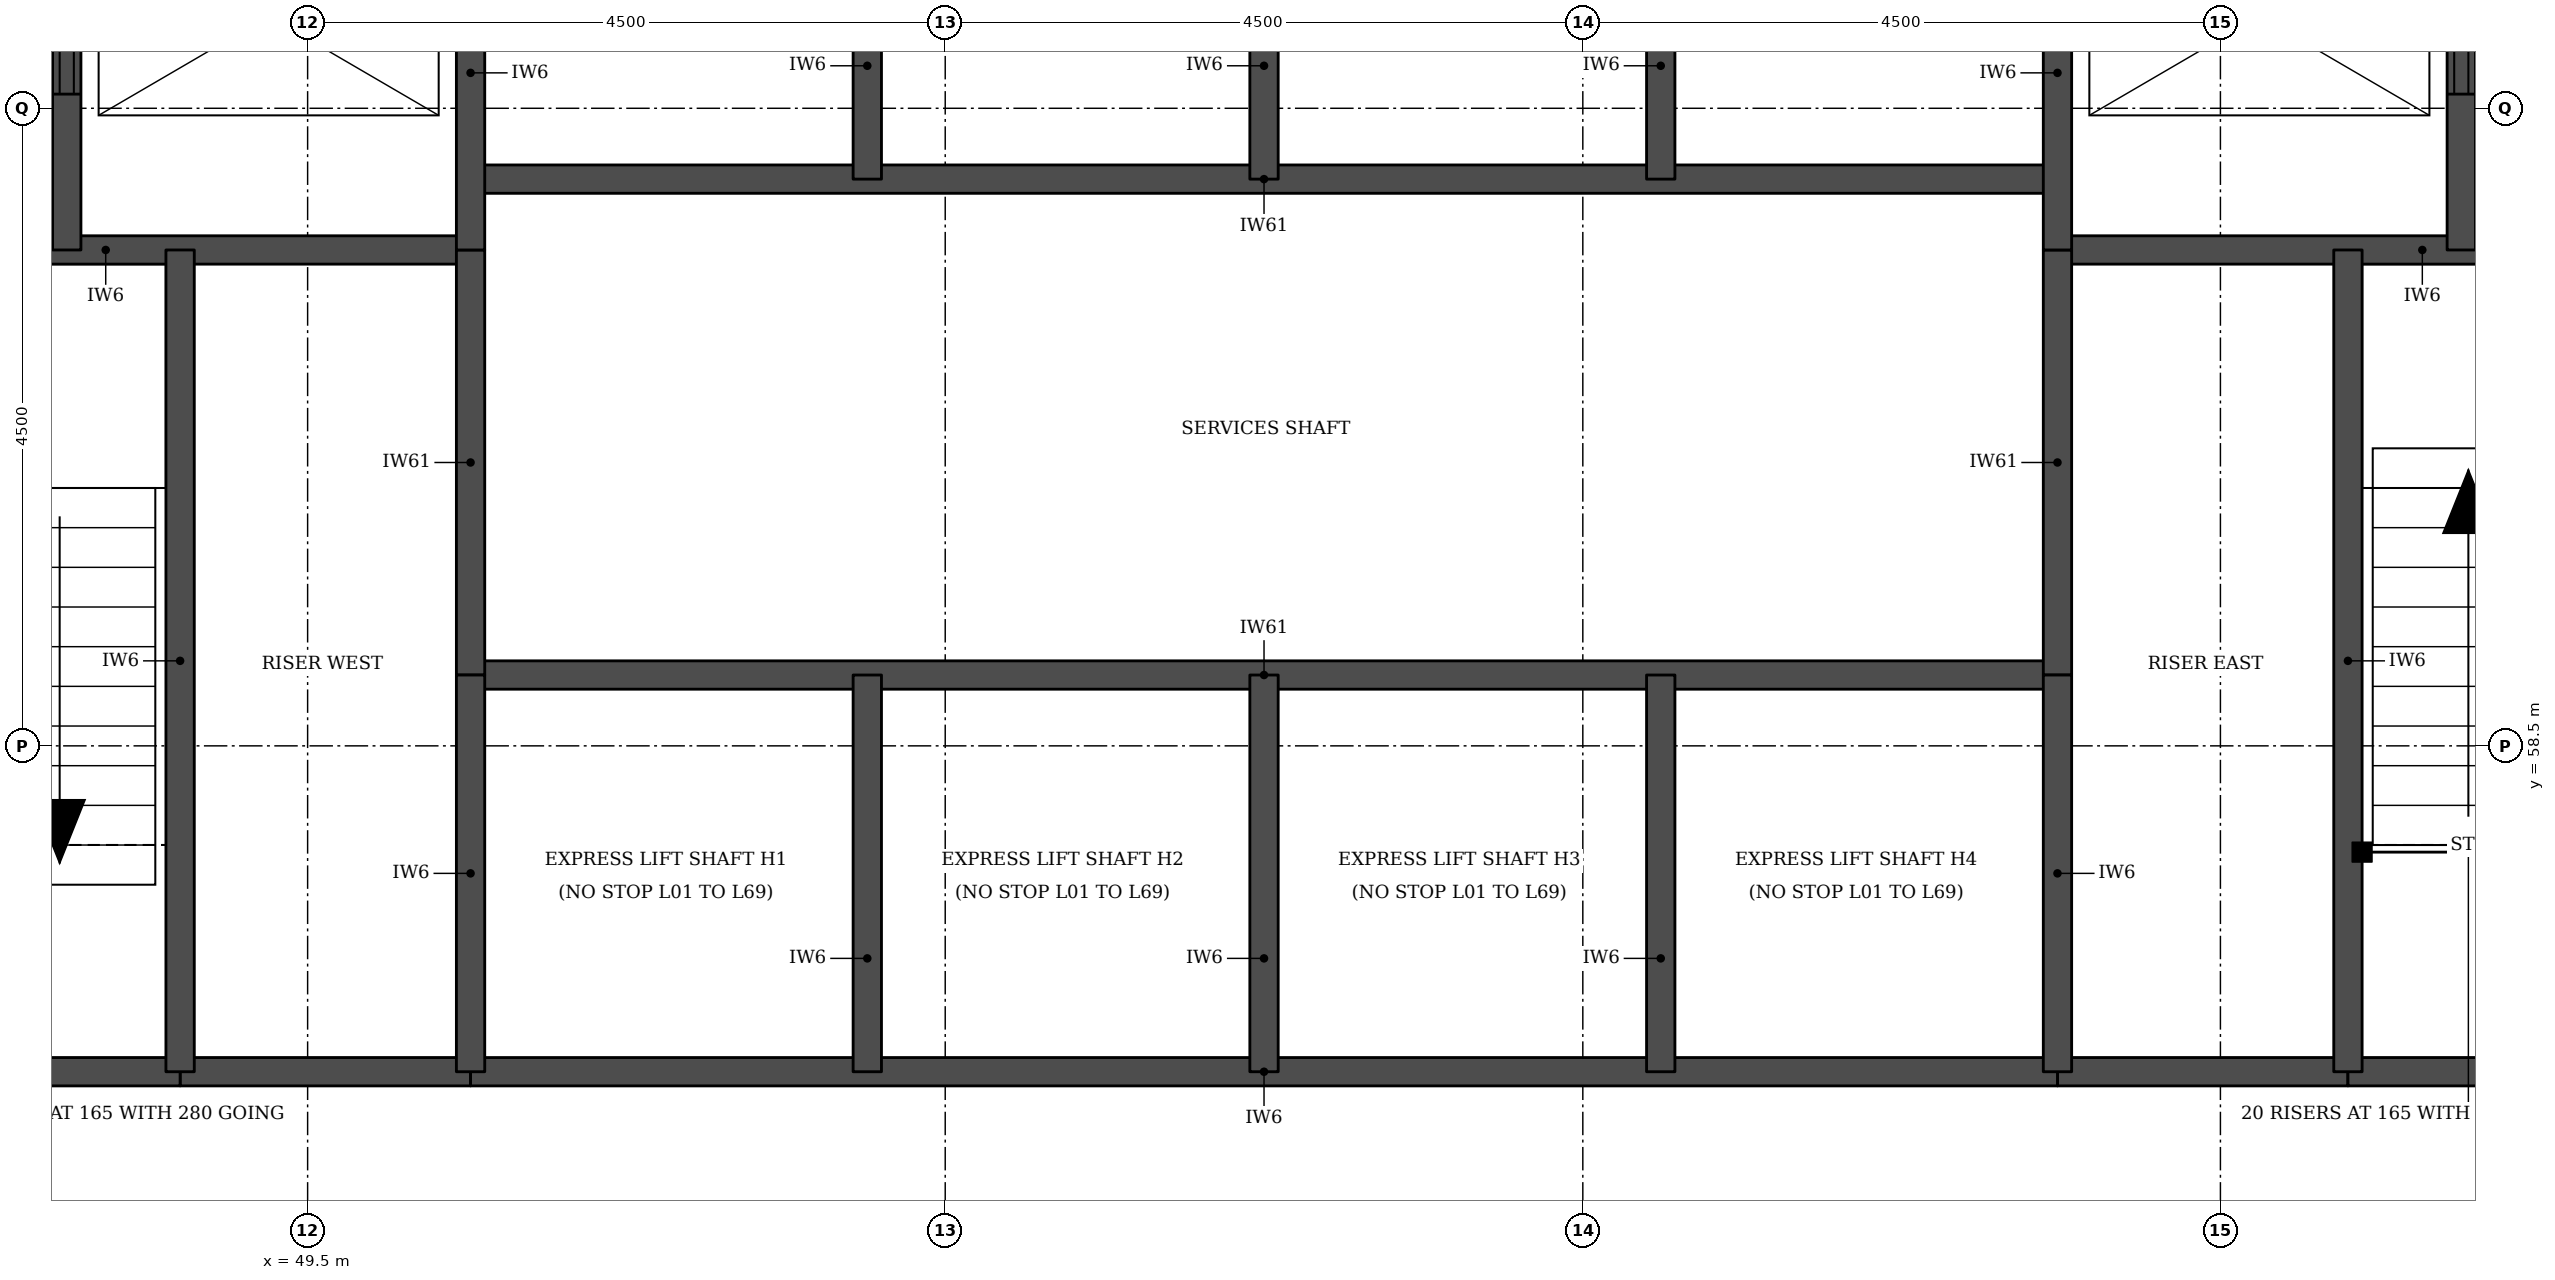
"""IFC4 building model, lengths in metres.
Left out: names, types, materials, properties, quantities, classifications, styles, units other than length and angle.
Written with IfcOpenShell. Run it as: python <this file> out.ifc"""

import sys

from ifc_helpers import new_model, si_unit, direction, frame, frame_2d, origin, place, context, subcontext, project, spatial, rectangle, extrude, element, fill, save


model = new_model("IFC4")
c1 = context("Model", 3, precision=1e-05, world=origin(), true_north=direction((0.0, 1.0)))
c2 = subcontext(c1, "Body", "Model", "MODEL_VIEW")
j1 = project(units=[si_unit("LENGTHUNIT", "METRE"), si_unit("PLANEANGLEUNIT", "RADIAN")], contexts=[c1])
p1 = place(None, origin())
s1 = spatial("IfcSite", under=j1, at=p1, CompositionType="ELEMENT")
p2 = place(p1, origin())
s2 = spatial("IfcBuilding", under=s1, at=p2, CompositionType="ELEMENT")
p3 = place(p2, frame((0.0, 0.0, 26.4)))
s3 = spatial("IfcBuildingStorey", under=s2, at=p3, CompositionType="ELEMENT", Elevation=26.4)
for number, where, z_axis, x_axis in (
    (1, (48.6, 56.2, 0.0), (0.0, 0.0, 1.0), (1.0, 0.0, 0.0)),
    (2, (61.85, 56.2, 0.0), (0.0, 0.0, 1.0), (1.0, 0.0, 0.0)),
):
    element("IfcWall", number, at=place(p3, frame(where, z_axis=z_axis, x_axis=x_axis)), inside=s3, PredefinedType="SOLIDWALL", context=c2, shape_type="SweptSolid", body=[
        extrude(rectangle(XDim=2.05, YDim=0.2, at=frame_2d((1.025, 0.0))), origin(), (0.0, 0.0, 1.0), 3.08),
    ])
p4 = place(p3, frame((45.5, 56.2, 0.0), z_axis=(0.0, 0.0, 1.0), x_axis=(1.0, 0.0, 0.0)))
e3 = element("IfcWall", 3, at=p4, inside=s3, PredefinedType="SOLIDWALL", context=c2, shape_type="SweptSolid", body=[
    extrude(rectangle(XDim=3.1, YDim=0.2, at=frame_2d((1.55, 0.0))), origin(), (0.0, 0.0, 1.0), 3.08),
])
p5 = place(p3, frame((50.65, 56.2, 0.0), z_axis=(0.0, 0.0, 1.0), x_axis=(1.0, 0.0, 0.0)))
e4 = element("IfcWall", 4, at=p5, inside=s3, PredefinedType="SOLIDWALL", context=c2, shape_type="SweptSolid", body=[
    extrude(rectangle(XDim=11.2, YDim=0.2, at=frame_2d((5.6, 0.0))), origin(), (0.0, 0.0, 1.0), 3.08),
])
p6 = place(p3, frame((63.9, 56.2, 0.0), z_axis=(0.0, 0.0, 1.0), x_axis=(1.0, 0.0, 0.0)))
e5 = element("IfcWall", 5, at=p6, inside=s3, PredefinedType="SOLIDWALL", context=c2, shape_type="SweptSolid", body=[
    extrude(rectangle(XDim=3.1, YDim=0.2, at=frame_2d((1.55, 0.0))), origin(), (0.0, 0.0, 1.0), 3.08),
])
p7 = place(p3, frame((50.65, 59.0, 0.0), z_axis=(0.0, 0.0, 1.0), x_axis=(1.0, 0.0, 0.0)))
e6 = element("IfcWall", 6, at=p7, inside=s3, PredefinedType="SOLIDWALL", context=c2, shape_type="SweptSolid", body=[
    extrude(rectangle(XDim=11.2, YDim=0.2, at=frame_2d((5.6, 0.0))), origin(), (0.0, 0.0, 1.0), 3.3),
])
for number, where, z_axis, x_axis in (
    (7, (45.5, 62.0, 0.0), (0.0, 0.0, 1.0), (1.0, 0.0, 0.0)),
    (8, (61.85, 62.0, 0.0), (0.0, 0.0, 1.0), (1.0, 0.0, 0.0)),
):
    element("IfcWall", number, at=place(p3, frame(where, z_axis=z_axis, x_axis=x_axis)), inside=s3, PredefinedType="SOLIDWALL", context=c2, shape_type="SweptSolid", body=[
        extrude(rectangle(XDim=5.15, YDim=0.2, at=frame_2d((2.575, 0.0))), origin(), (0.0, 0.0, 1.0), 3.08),
    ])
p8 = place(p3, frame((50.65, 62.5, 0.0), z_axis=(0.0, 0.0, 1.0), x_axis=(1.0, 0.0, 0.0)))
e9 = element("IfcWall", 9, at=p8, inside=s3, PredefinedType="SOLIDWALL", context=c2, shape_type="SweptSolid", body=[
    extrude(rectangle(XDim=11.2, YDim=0.2, at=frame_2d((5.6, 0.0))), origin(), (0.0, 0.0, 1.0), 3.3),
])
p9 = place(p3, frame((47.8, 62.0, 0.0), z_axis=(0.0, 0.0, 1.0), x_axis=(0.0, 1.0, 0.0)))
e10 = element("IfcWall", 10, at=p9, inside=s3, PredefinedType="SOLIDWALL", context=c2, shape_type="SweptSolid", body=[
    extrude(rectangle(XDim=3.3, YDim=0.2, at=frame_2d((1.65, 0.0))), origin(), (0.0, 0.0, 1.0), 3.08),
])
p10 = place(p9, frame((1.1, 0.0, 0.0)))
e11 = element("IfcOpeningElement", 11, at=p10, cuts=e10, PredefinedType="OPENING", context=c2, shape_type="SweptSolid", body=[
    extrude(rectangle(XDim=1.1, YDim=2.1, at=frame_2d((0.55, 1.05))), frame((0.0, 0.11, 0.0), z_axis=(0.0, -1.0, 0.0), x_axis=(1.0, 0.0, 0.0)), (0.0, 0.0, 1.0), 0.22),
])
p11 = place(p3, frame((48.6, 56.2, 0.0), z_axis=(0.0, 0.0, 1.0), x_axis=(0.0, 1.0, 0.0)))
e12 = element("IfcWall", 12, at=p11, inside=s3, PredefinedType="SOLIDWALL", context=c2, shape_type="SweptSolid", body=[
    extrude(rectangle(XDim=5.8, YDim=0.2, at=frame_2d((2.9, 0.0))), origin(), (0.0, 0.0, 1.0), 3.08),
])
p12 = place(p3, frame((50.65, 59.0, 0.0), z_axis=(0.0, 0.0, 1.0), x_axis=(0.0, 1.0, 0.0)))
e13 = element("IfcWall", 13, at=p12, inside=s3, PredefinedType="SOLIDWALL", context=c2, shape_type="SweptSolid", body=[
    extrude(rectangle(XDim=3.0, YDim=0.2, at=frame_2d((1.5, 0.0))), origin(), (0.0, 0.0, 1.0), 3.3),
])
p13 = place(p3, frame((50.65, 56.2, 0.0), z_axis=(0.0, 0.0, 1.0), x_axis=(0.0, 1.0, 0.0)))
e14 = element("IfcWall", 14, at=p13, inside=s3, PredefinedType="SOLIDWALL", context=c2, shape_type="SweptSolid", body=[
    extrude(rectangle(XDim=2.8, YDim=0.2, at=frame_2d((1.4, 0.0))), origin(), (0.0, 0.0, 1.0), 3.08),
])
p14 = place(p3, frame((50.65, 62.0, 0.0), z_axis=(0.0, 0.0, 1.0), x_axis=(0.0, 1.0, 0.0)))
e15 = element("IfcWall", 15, at=p14, inside=s3, PredefinedType="SOLIDWALL", context=c2, shape_type="SweptSolid", body=[
    extrude(rectangle(XDim=3.3, YDim=0.2, at=frame_2d((1.65, 0.0))), origin(), (0.0, 0.0, 1.0), 3.08),
])
for number, where, z_axis, x_axis in (
    (16, (53.45, 56.2, 0.0), (0.0, 0.0, 1.0), (0.0, 1.0, 0.0)),
    (17, (53.45, 62.5, 0.0), (0.0, 0.0, 1.0), (0.0, 1.0, 0.0)),
    (18, (56.25, 56.2, 0.0), (0.0, 0.0, 1.0), (0.0, 1.0, 0.0)),
    (19, (56.25, 62.5, 0.0), (0.0, 0.0, 1.0), (0.0, 1.0, 0.0)),
    (20, (59.05, 56.2, 0.0), (0.0, 0.0, 1.0), (0.0, 1.0, 0.0)),
    (21, (59.05, 62.5, 0.0), (0.0, 0.0, 1.0), (0.0, 1.0, 0.0)),
):
    element("IfcWall", number, at=place(p3, frame(where, z_axis=z_axis, x_axis=x_axis)), inside=s3, PredefinedType="SOLIDWALL", context=c2, shape_type="SweptSolid", body=[
        extrude(rectangle(XDim=2.8, YDim=0.2, at=frame_2d((1.4, 0.0))), origin(), (0.0, 0.0, 1.0), 3.08),
    ])
p15 = place(p3, frame((61.85, 59.0, 0.0), z_axis=(0.0, 0.0, 1.0), x_axis=(0.0, 1.0, 0.0)))
e22 = element("IfcWall", 22, at=p15, inside=s3, PredefinedType="SOLIDWALL", context=c2, shape_type="SweptSolid", body=[
    extrude(rectangle(XDim=3.0, YDim=0.2, at=frame_2d((1.5, 0.0))), origin(), (0.0, 0.0, 1.0), 3.3),
])
p16 = place(p3, frame((61.85, 56.2, 0.0), z_axis=(0.0, 0.0, 1.0), x_axis=(0.0, 1.0, 0.0)))
e23 = element("IfcWall", 23, at=p16, inside=s3, PredefinedType="SOLIDWALL", context=c2, shape_type="SweptSolid", body=[
    extrude(rectangle(XDim=2.8, YDim=0.2, at=frame_2d((1.4, 0.0))), origin(), (0.0, 0.0, 1.0), 3.08),
])
p17 = place(p3, frame((61.85, 62.0, 0.0), z_axis=(0.0, 0.0, 1.0), x_axis=(0.0, 1.0, 0.0)))
e24 = element("IfcWall", 24, at=p17, inside=s3, PredefinedType="SOLIDWALL", context=c2, shape_type="SweptSolid", body=[
    extrude(rectangle(XDim=3.3, YDim=0.2, at=frame_2d((1.65, 0.0))), origin(), (0.0, 0.0, 1.0), 3.08),
])
p18 = place(p3, frame((63.9, 56.2, 0.0), z_axis=(0.0, 0.0, 1.0), x_axis=(0.0, 1.0, 0.0)))
e25 = element("IfcWall", 25, at=p18, inside=s3, PredefinedType="SOLIDWALL", context=c2, shape_type="SweptSolid", body=[
    extrude(rectangle(XDim=5.8, YDim=0.2, at=frame_2d((2.9, 0.0))), origin(), (0.0, 0.0, 1.0), 3.08),
])
p19 = place(p3, frame((64.7, 62.0, 0.0), z_axis=(0.0, 0.0, 1.0), x_axis=(0.0, 1.0, 0.0)))
e26 = element("IfcWall", 26, at=p19, inside=s3, PredefinedType="SOLIDWALL", context=c2, shape_type="SweptSolid", body=[
    extrude(rectangle(XDim=3.3, YDim=0.2, at=frame_2d((1.65, 0.0))), origin(), (0.0, 0.0, 1.0), 3.08),
])
p20 = place(p19, frame((1.1, 0.0, 0.0)))
e27 = element("IfcOpeningElement", 27, at=p20, cuts=e26, PredefinedType="OPENING", context=c2, shape_type="SweptSolid", body=[
    extrude(rectangle(XDim=1.1, YDim=2.1, at=frame_2d((0.55, 1.05))), frame((0.0, 0.11, 0.0), z_axis=(0.0, -1.0, 0.0), x_axis=(1.0, 0.0, 0.0)), (0.0, 0.0, 1.0), 0.22),
])
p21 = place(p10, origin())
e28 = element("IfcDoor", 28, at=p21, inside=s3, OperationType="DOUBLE_DOOR_SLIDING", PredefinedType="DOOR", context=c2, shape_type="SweptSolid", body=[
    extrude(rectangle(XDim=1.1, YDim=2.1, at=frame_2d((0.55, 1.05))), frame((0.0, 0.025, 0.0), z_axis=(0.0, -1.0, 0.0), x_axis=(1.0, 0.0, 0.0)), (0.0, 0.0, 1.0), 0.05),
])
fill(e11, e28)
p22 = place(p20, origin())
e29 = element("IfcDoor", 29, at=p22, inside=s3, OperationType="DOUBLE_DOOR_SLIDING", PredefinedType="DOOR", context=c2, shape_type="SweptSolid", body=[
    extrude(rectangle(XDim=1.1, YDim=2.1, at=frame_2d((0.55, 1.05))), frame((0.0, 0.025, 0.0), z_axis=(0.0, -1.0, 0.0), x_axis=(1.0, 0.0, 0.0)), (0.0, 0.0, 1.0), 0.05),
])
fill(e27, e29)
save(model, sys.argv[1])
